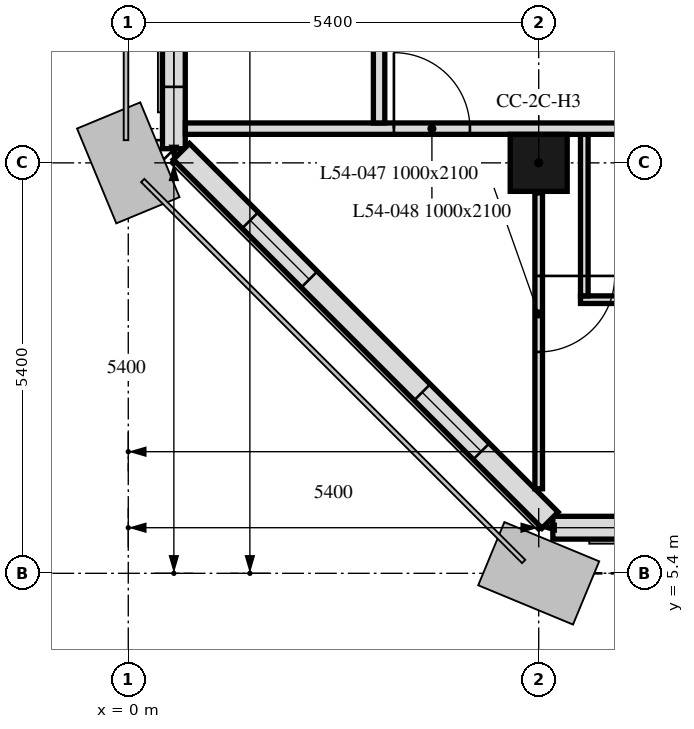
"""IFC4 building model, lengths in metres.
Left out: names, types, materials, properties, quantities, classifications, styles, units other than length and angle.
Written with IfcOpenShell. Run it as: python <this file> out.ifc"""

import sys

from ifc_helpers import new_model, si_unit, direction, frame, frame_2d, origin, origin_2d, place, context, subcontext, project, spatial, rectangle, extrude, element, fill, save


model = new_model("IFC4")
c1 = context("Model", 3, precision=1e-05, world=origin(), true_north=direction((0.0, 1.0)))
c2 = subcontext(c1, "Body", "Model", "MODEL_VIEW")
j1 = project(units=[si_unit("LENGTHUNIT", "METRE"), si_unit("PLANEANGLEUNIT", "RADIAN")], contexts=[c1])
p1 = place(None, origin())
s1 = spatial("IfcSite", under=j1, at=p1, CompositionType="ELEMENT")
p2 = place(p1, origin())
s2 = spatial("IfcBuilding", under=s1, at=p2, CompositionType="ELEMENT")
p3 = place(p2, frame((0.0, 0.0, 217.0)))
s3 = spatial("IfcBuildingStorey", under=s2, at=p3, CompositionType="ELEMENT", Elevation=217.0)
p4 = place(p3, frame((5.4, 10.8, 0.0), z_axis=(0.0, 0.0, 1.0), x_axis=(1.0, 0.0, 0.0)))
e1 = element("IfcColumn", 1, at=p4, inside=s3, PredefinedType="COLUMN", context=c2, shape_type="SweptSolid", body=[
    extrude(rectangle(XDim=0.75, YDim=0.75, at=origin_2d()), origin(), (0.0, 0.0, 1.0), 3.0),
])
p5 = place(p3, frame((5.586, 6.0, 0.0), z_axis=(0.0, 0.0, 1.0), x_axis=(1.0, 0.0, 0.0)))
e2 = element("IfcWall", 2, at=p5, inside=s3, PredefinedType="SOLIDWALL", context=c2, shape_type="SweptSolid", body=[
    extrude(rectangle(XDim=32.027, YDim=0.3, at=frame_2d((16.014, 0.0))), origin(), (0.0, 0.0, 1.0), 3.0),
])
p6 = place(p5, frame((2.764, 0.0, 0.9)))
e3 = element("IfcOpeningElement", 3, at=p6, cuts=e2, PredefinedType="OPENING", context=c2, shape_type="SweptSolid", body=[
    extrude(rectangle(XDim=1.1, YDim=1.7, at=frame_2d((0.55, 0.85))), frame((0.0, 0.16, 0.0), z_axis=(0.0, -1.0, 0.0), x_axis=(1.0, 0.0, 0.0)), (0.0, 0.0, 1.0), 0.32),
])
p7 = place(p5, frame((6.214, 0.0, 0.9)))
e4 = element("IfcOpeningElement", 4, at=p7, cuts=e2, PredefinedType="OPENING", context=c2, shape_type="SweptSolid", body=[
    extrude(rectangle(XDim=3.4, YDim=1.7, at=frame_2d((1.7, 0.85))), frame((0.0, 0.16, 0.0), z_axis=(0.0, -1.0, 0.0), x_axis=(1.0, 0.0, 0.0)), (0.0, 0.0, 1.0), 0.32),
])
p8 = place(p5, frame((13.564, 0.0, 0.9)))
e5 = element("IfcOpeningElement", 5, at=p8, cuts=e2, PredefinedType="OPENING", context=c2, shape_type="SweptSolid", body=[
    extrude(rectangle(XDim=1.1, YDim=1.7, at=frame_2d((0.55, 0.85))), frame((0.0, 0.16, 0.0), z_axis=(0.0, -1.0, 0.0), x_axis=(1.0, 0.0, 0.0)), (0.0, 0.0, 1.0), 0.32),
])
p9 = place(p5, frame((17.014, 0.0, 0.9)))
e6 = element("IfcOpeningElement", 6, at=p9, cuts=e2, PredefinedType="OPENING", context=c2, shape_type="SweptSolid", body=[
    extrude(rectangle(XDim=3.4, YDim=1.7, at=frame_2d((1.7, 0.85))), frame((0.0, 0.16, 0.0), z_axis=(0.0, -1.0, 0.0), x_axis=(1.0, 0.0, 0.0)), (0.0, 0.0, 1.0), 0.32),
])
p10 = place(p5, frame((24.364, 0.0, 0.9)))
e7 = element("IfcOpeningElement", 7, at=p10, cuts=e2, PredefinedType="OPENING", context=c2, shape_type="SweptSolid", body=[
    extrude(rectangle(XDim=1.1, YDim=1.7, at=frame_2d((0.55, 0.85))), frame((0.0, 0.16, 0.0), z_axis=(0.0, -1.0, 0.0), x_axis=(1.0, 0.0, 0.0)), (0.0, 0.0, 1.0), 0.32),
])
p11 = place(p5, frame((27.814, 0.0, 0.9)))
e8 = element("IfcOpeningElement", 8, at=p11, cuts=e2, PredefinedType="OPENING", context=c2, shape_type="SweptSolid", body=[
    extrude(rectangle(XDim=3.4, YDim=1.7, at=frame_2d((1.7, 0.85))), frame((0.0, 0.16, 0.0), z_axis=(0.0, -1.0, 0.0), x_axis=(1.0, 0.0, 0.0)), (0.0, 0.0, 1.0), 0.32),
])
p12 = place(p3, frame((0.6, 43.014, 0.0), z_axis=(0.0, 0.0, 1.0), x_axis=(0.0, -1.0, 0.0)))
e9 = element("IfcWall", 9, at=p12, inside=s3, PredefinedType="SOLIDWALL", context=c2, shape_type="SweptSolid", body=[
    extrude(rectangle(XDim=32.027, YDim=0.3, at=frame_2d((16.014, 0.0))), origin(), (0.0, 0.0, 1.0), 3.0),
])
p13 = place(p12, frame((1.789, 0.0, 0.9)))
e10 = element("IfcOpeningElement", 10, at=p13, cuts=e9, PredefinedType="OPENING", context=c2, shape_type="SweptSolid", body=[
    extrude(rectangle(XDim=0.65, YDim=1.7, at=frame_2d((0.325, 0.85))), frame((0.0, 0.16, 0.0), z_axis=(0.0, -1.0, 0.0), x_axis=(1.0, 0.0, 0.0)), (0.0, 0.0, 1.0), 0.32),
])
p14 = place(p12, frame((2.764, 0.0, 0.9)))
e11 = element("IfcOpeningElement", 11, at=p14, cuts=e9, PredefinedType="OPENING", context=c2, shape_type="SweptSolid", body=[
    extrude(rectangle(XDim=1.1, YDim=1.7, at=frame_2d((0.55, 0.85))), frame((0.0, 0.16, 0.0), z_axis=(0.0, -1.0, 0.0), x_axis=(1.0, 0.0, 0.0)), (0.0, 0.0, 1.0), 0.32),
])
p15 = place(p12, frame((6.214, 0.0, 0.9)))
e12 = element("IfcOpeningElement", 12, at=p15, cuts=e9, PredefinedType="OPENING", context=c2, shape_type="SweptSolid", body=[
    extrude(rectangle(XDim=3.4, YDim=1.7, at=frame_2d((1.7, 0.85))), frame((0.0, 0.16, 0.0), z_axis=(0.0, -1.0, 0.0), x_axis=(1.0, 0.0, 0.0)), (0.0, 0.0, 1.0), 0.32),
])
p16 = place(p12, frame((11.964, 0.0, 0.9)))
e13 = element("IfcOpeningElement", 13, at=p16, cuts=e9, PredefinedType="OPENING", context=c2, shape_type="SweptSolid", body=[
    extrude(rectangle(XDim=1.1, YDim=1.7, at=frame_2d((0.55, 0.85))), frame((0.0, 0.16, 0.0), z_axis=(0.0, -1.0, 0.0), x_axis=(1.0, 0.0, 0.0)), (0.0, 0.0, 1.0), 0.32),
])
p17 = place(p12, frame((13.564, 0.0, 0.9)))
e14 = element("IfcOpeningElement", 14, at=p17, cuts=e9, PredefinedType="OPENING", context=c2, shape_type="SweptSolid", body=[
    extrude(rectangle(XDim=1.1, YDim=1.7, at=frame_2d((0.55, 0.85))), frame((0.0, 0.16, 0.0), z_axis=(0.0, -1.0, 0.0), x_axis=(1.0, 0.0, 0.0)), (0.0, 0.0, 1.0), 0.32),
])
p18 = place(p12, frame((17.364, 0.0, 0.9)))
e15 = element("IfcOpeningElement", 15, at=p18, cuts=e9, PredefinedType="OPENING", context=c2, shape_type="SweptSolid", body=[
    extrude(rectangle(XDim=1.1, YDim=1.7, at=frame_2d((0.55, 0.85))), frame((0.0, 0.16, 0.0), z_axis=(0.0, -1.0, 0.0), x_axis=(1.0, 0.0, 0.0)), (0.0, 0.0, 1.0), 0.32),
])
p19 = place(p12, frame((18.964, 0.0, 0.9)))
e16 = element("IfcOpeningElement", 16, at=p19, cuts=e9, PredefinedType="OPENING", context=c2, shape_type="SweptSolid", body=[
    extrude(rectangle(XDim=1.1, YDim=1.7, at=frame_2d((0.55, 0.85))), frame((0.0, 0.16, 0.0), z_axis=(0.0, -1.0, 0.0), x_axis=(1.0, 0.0, 0.0)), (0.0, 0.0, 1.0), 0.32),
])
p20 = place(p12, frame((22.764, 0.0, 0.9)))
e17 = element("IfcOpeningElement", 17, at=p20, cuts=e9, PredefinedType="OPENING", context=c2, shape_type="SweptSolid", body=[
    extrude(rectangle(XDim=1.1, YDim=1.7, at=frame_2d((0.55, 0.85))), frame((0.0, 0.16, 0.0), z_axis=(0.0, -1.0, 0.0), x_axis=(1.0, 0.0, 0.0)), (0.0, 0.0, 1.0), 0.32),
])
p21 = place(p12, frame((24.364, 0.0, 0.9)))
e18 = element("IfcOpeningElement", 18, at=p21, cuts=e9, PredefinedType="OPENING", context=c2, shape_type="SweptSolid", body=[
    extrude(rectangle(XDim=1.1, YDim=1.7, at=frame_2d((0.55, 0.85))), frame((0.0, 0.16, 0.0), z_axis=(0.0, -1.0, 0.0), x_axis=(1.0, 0.0, 0.0)), (0.0, 0.0, 1.0), 0.32),
])
p22 = place(p12, frame((27.814, 0.0, 0.9)))
e19 = element("IfcOpeningElement", 19, at=p22, cuts=e9, PredefinedType="OPENING", context=c2, shape_type="SweptSolid", body=[
    extrude(rectangle(XDim=3.4, YDim=1.7, at=frame_2d((1.7, 0.85))), frame((0.0, 0.16, 0.0), z_axis=(0.0, -1.0, 0.0), x_axis=(1.0, 0.0, 0.0)), (0.0, 0.0, 1.0), 0.32),
])
p23 = place(p3, frame((0.699, 10.949, 0.0), z_axis=(0.0, 0.0, 1.0), x_axis=(0.707106781187, -0.707106781187, 0.0)))
e20 = element("IfcWall", 20, at=p23, inside=s3, PredefinedType="SOLIDWALL", context=c2, shape_type="SweptSolid", body=[
    extrude(rectangle(XDim=6.86, YDim=0.3, at=frame_2d((3.43, 0.0))), origin(), (0.0, 0.0, 1.0), 3.0),
])
p24 = place(p23, frame((1.28, 0.0, 0.9)))
e21 = element("IfcOpeningElement", 21, at=p24, cuts=e20, PredefinedType="OPENING", context=c2, shape_type="SweptSolid", body=[
    extrude(rectangle(XDim=1.1, YDim=1.7, at=frame_2d((0.55, 0.85))), frame((0.0, 0.16, 0.0), z_axis=(0.0, -1.0, 0.0), x_axis=(1.0, 0.0, 0.0)), (0.0, 0.0, 1.0), 0.32),
])
p25 = place(p23, frame((4.48, 0.0, 0.9)))
e22 = element("IfcOpeningElement", 22, at=p25, cuts=e20, PredefinedType="OPENING", context=c2, shape_type="SweptSolid", body=[
    extrude(rectangle(XDim=1.1, YDim=1.7, at=frame_2d((0.55, 0.85))), frame((0.0, 0.16, 0.0), z_axis=(0.0, -1.0, 0.0), x_axis=(1.0, 0.0, 0.0)), (0.0, 0.0, 1.0), 0.32),
])
p26 = place(p3, frame((8.35, 9.0, 0.0), z_axis=(0.0, 0.0, 1.0), x_axis=(-1.0, 0.0, 0.0)))
e23 = element("IfcWall", 23, at=p26, inside=s3, PredefinedType="PARTITIONING", context=c2, shape_type="SweptSolid", body=[
    extrude(rectangle(XDim=2.4, YDim=0.1, at=frame_2d((1.2, 0.0))), origin(), (0.0, 0.0, 1.0), 3.0),
])
p27 = place(p26, frame((0.25, 0.0, 0.0)))
e24 = element("IfcOpeningElement", 24, at=p27, cuts=e23, PredefinedType="OPENING", context=c2, shape_type="SweptSolid", body=[
    extrude(rectangle(XDim=0.9, YDim=2.1, at=frame_2d((0.45, 1.05))), frame((0.0, 0.05, 0.0), z_axis=(0.0, -1.0, 0.0), x_axis=(1.0, 0.0, 0.0)), (0.0, 0.0, 1.0), 0.1),
])
p28 = place(p3, frame((6.0, 9.05, 0.0), z_axis=(0.0, 0.0, 1.0), x_axis=(0.0, 1.0, 0.0)))
e25 = element("IfcWall", 25, at=p28, inside=s3, PredefinedType="PARTITIONING", context=c2, shape_type="SweptSolid", body=[
    extrude(rectangle(XDim=2.125, YDim=0.1, at=frame_2d((1.062, 0.0))), origin(), (0.0, 0.0, 1.0), 3.0),
])
p29 = place(p3, frame((5.4, 10.405, 0.0), z_axis=(0.0, 0.0, 1.0), x_axis=(0.0, -1.0, 0.0)))
e26 = element("IfcWall", 26, at=p29, inside=s3, PredefinedType="PARTITIONING", context=c2, shape_type="SweptSolid", body=[
    extrude(rectangle(XDim=3.893, YDim=0.1, at=frame_2d((1.946, 0.0))), origin(), (0.0, 0.0, 1.0), 3.0),
])
p30 = place(p29, frame((1.093, 0.0, 0.0)))
e27 = element("IfcOpeningElement", 27, at=p30, cuts=e26, PredefinedType="OPENING", context=c2, shape_type="SweptSolid", body=[
    extrude(rectangle(XDim=1.0, YDim=2.1, at=frame_2d((0.5, 1.05))), frame((0.0, 0.05, 0.0), z_axis=(0.0, -1.0, 0.0), x_axis=(1.0, 0.0, 0.0)), (0.0, 0.0, 1.0), 0.1),
])
p31 = place(p3, frame((0.751, 11.25, 0.0), z_axis=(0.0, 0.0, 1.0), x_axis=(1.0, 0.0, 0.0)))
e28 = element("IfcWall", 28, at=p31, inside=s3, PredefinedType="PARTITIONING", context=c2, shape_type="SweptSolid", body=[
    extrude(rectangle(XDim=41.698, YDim=0.15, at=frame_2d((20.849, 0.0))), origin(), (0.0, 0.0, 1.0), 3.0),
])
p32 = place(p31, frame((39.249, 0.0, 0.0)))
e29 = element("IfcOpeningElement", 29, at=p32, cuts=e28, PredefinedType="OPENING", context=c2, shape_type="SweptSolid", body=[
    extrude(rectangle(XDim=1.0, YDim=2.1, at=frame_2d((0.5, 1.05))), frame((0.0, 0.075, 0.0), z_axis=(0.0, -1.0, 0.0), x_axis=(1.0, 0.0, 0.0)), (0.0, 0.0, 1.0), 0.15),
])
p33 = place(p31, frame((27.649, 0.0, 0.0)))
e30 = element("IfcOpeningElement", 30, at=p33, cuts=e28, PredefinedType="OPENING", context=c2, shape_type="SweptSolid", body=[
    extrude(rectangle(XDim=1.0, YDim=2.1, at=frame_2d((0.5, 1.05))), frame((0.0, 0.075, 0.0), z_axis=(0.0, -1.0, 0.0), x_axis=(1.0, 0.0, 0.0)), (0.0, 0.0, 1.0), 0.15),
])
p34 = place(p31, frame((23.049, 0.0, 0.0)))
e31 = element("IfcOpeningElement", 31, at=p34, cuts=e28, PredefinedType="OPENING", context=c2, shape_type="SweptSolid", body=[
    extrude(rectangle(XDim=1.0, YDim=2.1, at=frame_2d((0.5, 1.05))), frame((0.0, 0.075, 0.0), z_axis=(0.0, -1.0, 0.0), x_axis=(1.0, 0.0, 0.0)), (0.0, 0.0, 1.0), 0.15),
])
p35 = place(p31, frame((11.449, 0.0, 0.0)))
e32 = element("IfcOpeningElement", 32, at=p35, cuts=e28, PredefinedType="OPENING", context=c2, shape_type="SweptSolid", body=[
    extrude(rectangle(XDim=1.0, YDim=2.1, at=frame_2d((0.5, 1.05))), frame((0.0, 0.075, 0.0), z_axis=(0.0, -1.0, 0.0), x_axis=(1.0, 0.0, 0.0)), (0.0, 0.0, 1.0), 0.15),
])
p36 = place(p31, frame((2.744, 0.0, 0.0)))
e33 = element("IfcOpeningElement", 33, at=p36, cuts=e28, PredefinedType="OPENING", context=c2, shape_type="SweptSolid", body=[
    extrude(rectangle(XDim=1.0, YDim=2.1, at=frame_2d((0.5, 1.05))), frame((0.0, 0.075, 0.0), z_axis=(0.0, -1.0, 0.0), x_axis=(1.0, 0.0, 0.0)), (0.0, 0.0, 1.0), 0.15),
])
p37 = place(p3, frame((3.3, 11.325, 0.0), z_axis=(0.0, 0.0, 1.0), x_axis=(0.0, 1.0, 0.0)))
e34 = element("IfcWall", 34, at=p37, inside=s3, PredefinedType="PARTITIONING", context=c2, shape_type="SweptSolid", body=[
    extrude(rectangle(XDim=30.0, YDim=0.15, at=frame_2d((15.0, 0.0))), origin(), (0.0, 0.0, 1.0), 2.4),
])
p38 = place(p37, frame((17.875, 0.0, 0.0)))
e35 = element("IfcOpeningElement", 35, at=p38, cuts=e34, PredefinedType="OPENING", context=c2, shape_type="SweptSolid", body=[
    extrude(rectangle(XDim=1.0, YDim=2.1, at=frame_2d((0.5, 1.05))), frame((0.0, 0.075, 0.0), z_axis=(0.0, -1.0, 0.0), x_axis=(1.0, 0.0, 0.0)), (0.0, 0.0, 1.0), 0.15),
])
p39 = place(p37, frame((1.9, 0.0, 0.0)))
e36 = element("IfcOpeningElement", 36, at=p39, cuts=e34, PredefinedType="OPENING", context=c2, shape_type="SweptSolid", body=[
    extrude(rectangle(XDim=1.0, YDim=2.1, at=frame_2d((0.5, 1.05))), frame((0.0, 0.075, 0.0), z_axis=(0.0, -1.0, 0.0), x_axis=(1.0, 0.0, 0.0)), (0.0, 0.0, 1.0), 0.15),
])
p40 = place(p37, frame((23.725, 0.0, 0.0)))
e37 = element("IfcOpeningElement", 37, at=p40, cuts=e34, PredefinedType="OPENING", context=c2, shape_type="SweptSolid", body=[
    extrude(rectangle(XDim=1.0, YDim=2.1, at=frame_2d((0.5, 1.05))), frame((0.0, 0.075, 0.0), z_axis=(0.0, -1.0, 0.0), x_axis=(1.0, 0.0, 0.0)), (0.0, 0.0, 1.0), 0.15),
])
p41 = place(p37, frame((8.425, 0.0, 0.0)))
e38 = element("IfcOpeningElement", 38, at=p41, cuts=e34, PredefinedType="OPENING", context=c2, shape_type="SweptSolid", body=[
    extrude(rectangle(XDim=1.0, YDim=2.1, at=frame_2d((0.5, 1.05))), frame((0.0, 0.075, 0.0), z_axis=(0.0, -1.0, 0.0), x_axis=(1.0, 0.0, 0.0)), (0.0, 0.0, 1.0), 0.15),
])
p42 = place(p22, origin())
e39 = element("IfcWindow", 39, at=p42, inside=s3, PartitioningType="SINGLE_PANEL", PredefinedType="WINDOW", context=c2, shape_type="SweptSolid", body=[
    extrude(rectangle(XDim=3.4, YDim=1.7, at=frame_2d((1.7, 0.85))), frame((0.0, 0.03, 0.0), z_axis=(0.0, -1.0, 0.0), x_axis=(1.0, 0.0, 0.0)), (0.0, 0.0, 1.0), 0.06),
])
fill(e19, e39)
p43 = place(p24, origin())
e40 = element("IfcWindow", 40, at=p43, inside=s3, PartitioningType="SINGLE_PANEL", PredefinedType="WINDOW", context=c2, shape_type="SweptSolid", body=[
    extrude(rectangle(XDim=1.1, YDim=1.7, at=frame_2d((0.55, 0.85))), frame((0.0, 0.03, 0.0), z_axis=(0.0, -1.0, 0.0), x_axis=(1.0, 0.0, 0.0)), (0.0, 0.0, 1.0), 0.06),
])
fill(e21, e40)
p44 = place(p25, origin())
e41 = element("IfcWindow", 41, at=p44, inside=s3, PartitioningType="SINGLE_PANEL", PredefinedType="WINDOW", context=c2, shape_type="SweptSolid", body=[
    extrude(rectangle(XDim=1.1, YDim=1.7, at=frame_2d((0.55, 0.85))), frame((0.0, 0.03, 0.0), z_axis=(0.0, -1.0, 0.0), x_axis=(1.0, 0.0, 0.0)), (0.0, 0.0, 1.0), 0.06),
])
fill(e22, e41)
p45 = place(p30, origin())
e42 = element("IfcDoor", 42, at=p45, inside=s3, OperationType="SINGLE_SWING_RIGHT", PredefinedType="DOOR", context=c2, shape_type="SweptSolid", body=[
    extrude(rectangle(XDim=1.0, YDim=2.1, at=frame_2d((0.5, 1.05))), frame((0.0, 0.025, 0.0), z_axis=(0.0, -1.0, 0.0), x_axis=(1.0, 0.0, 0.0)), (0.0, 0.0, 1.0), 0.05),
])
fill(e27, e42)
p46 = place(p36, origin())
e43 = element("IfcDoor", 43, at=p46, inside=s3, OperationType="SINGLE_SWING_LEFT", PredefinedType="DOOR", context=c2, shape_type="SweptSolid", body=[
    extrude(rectangle(XDim=1.0, YDim=2.1, at=frame_2d((0.5, 1.05))), frame((0.0, 0.025, 0.0), z_axis=(0.0, -1.0, 0.0), x_axis=(1.0, 0.0, 0.0)), (0.0, 0.0, 1.0), 0.05),
])
fill(e33, e43)
save(model, sys.argv[1])
